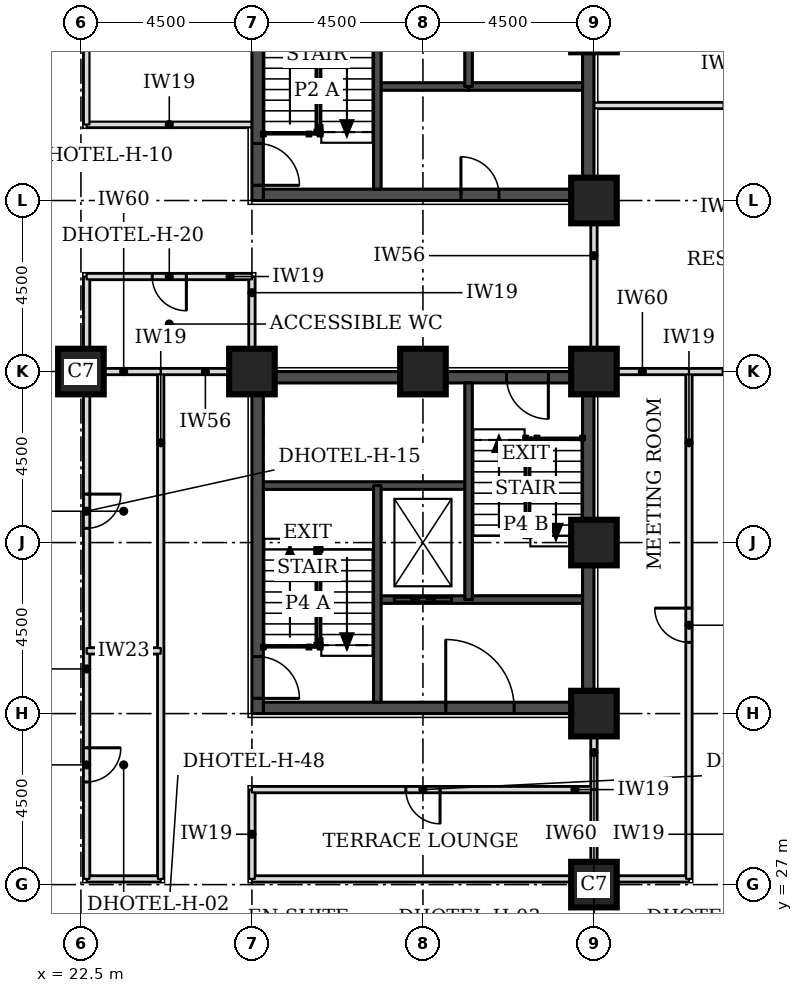
"""IFC4 building model, lengths in metres.
Left out: names, types, materials, properties, quantities, classifications, styles, units other than length and angle.
Written with IfcOpenShell. Run it as: python <this file> out.ifc"""

import sys

from ifc_helpers import new_model, si_unit, direction, frame, frame_2d, origin, origin_2d, place, context, subcontext, project, spatial, rectangle, extrude, element, fill, save


model = new_model("IFC4")
c1 = context("Model", 3, precision=1e-05, world=origin(), true_north=direction((0.0, 1.0)))
c2 = subcontext(c1, "Body", "Model", "MODEL_VIEW")
j1 = project(units=[si_unit("LENGTHUNIT", "METRE"), si_unit("PLANEANGLEUNIT", "RADIAN")], contexts=[c1])
p1 = place(None, origin())
s1 = spatial("IfcSite", under=j1, at=p1, CompositionType="ELEMENT")
p2 = place(p1, origin())
s2 = spatial("IfcBuilding", under=s1, at=p2, CompositionType="ELEMENT")
p3 = place(p2, frame((0.0, 0.0, 46.2)))
s3 = spatial("IfcBuildingStorey", under=s2, at=p3, CompositionType="ELEMENT", Elevation=46.2)
for number, where, z_axis, x_axis in (
    (1, (36.0, 27.0, 0.0), (0.0, 0.0, 1.0), (1.0, 0.0, 0.0)),
    (2, (36.0, 31.5, 0.0), (0.0, 0.0, 1.0), (1.0, 0.0, 0.0)),
    (3, (36.0, 36.0, 0.0), (0.0, 0.0, 1.0), (1.0, 0.0, 0.0)),
    (4, (22.5, 40.5, 0.0), (0.0, 0.0, 1.0), (1.0, 0.0, 0.0)),
    (5, (27.0, 40.5, 0.0), (0.0, 0.0, 1.0), (1.0, 0.0, 0.0)),
    (6, (31.5, 40.5, 0.0), (0.0, 0.0, 1.0), (1.0, 0.0, 0.0)),
    (7, (36.0, 40.5, 0.0), (0.0, 0.0, 1.0), (1.0, 0.0, 0.0)),
    (8, (36.0, 45.0, 0.0), (0.0, 0.0, 1.0), (1.0, 0.0, 0.0)),
):
    element("IfcColumn", number, at=place(p3, frame(where, z_axis=z_axis, x_axis=x_axis)), inside=s3, PredefinedType="COLUMN", context=c2, shape_type="SweptSolid", body=[
        extrude(rectangle(XDim=1.2, YDim=1.2, at=origin_2d()), origin(), (0.0, 0.0, 1.0), 3.3),
    ])
p4 = place(p3, frame((27.3, 45.15, 0.0), z_axis=(0.0, 0.0, 1.0), x_axis=(1.0, 0.0, 0.0)))
e9 = element("IfcWall", 9, at=p4, inside=s3, PredefinedType="SHEAR", context=c2, shape_type="SweptSolid", body=[
    extrude(rectangle(XDim=8.4, YDim=0.3, at=frame_2d((4.2, 0.0))), origin(), (0.0, 0.0, 1.0), 3.3),
])
p5 = place(p4, frame((5.2, 0.0, 0.0)))
e10 = element("IfcOpeningElement", 10, at=p5, cuts=e9, PredefinedType="OPENING", context=c2, shape_type="SweptSolid", body=[
    extrude(rectangle(XDim=1.0, YDim=2.1, at=frame_2d((0.5, 1.05))), frame((0.0, 0.16, 0.0), z_axis=(0.0, -1.0, 0.0), x_axis=(1.0, 0.0, 0.0)), (0.0, 0.0, 1.0), 0.32),
])
p6 = place(p3, frame((27.15, 45.0, 0.0), z_axis=(0.0, 0.0, 1.0), x_axis=(0.0, 1.0, 0.0)))
e11 = element("IfcWall", 11, at=p6, inside=s3, PredefinedType="SHEAR", context=c2, shape_type="SweptSolid", body=[
    extrude(rectangle(XDim=9.0, YDim=0.3, at=frame_2d((4.5, 0.0))), origin(), (0.0, 0.0, 1.0), 3.3),
])
p7 = place(p6, frame((0.4, 0.0, 0.0)))
e12 = element("IfcOpeningElement", 12, at=p7, cuts=e11, PredefinedType="OPENING", context=c2, shape_type="SweptSolid", body=[
    extrude(rectangle(XDim=1.1, YDim=2.1, at=frame_2d((0.55, 1.05))), frame((0.0, 0.16, 0.0), z_axis=(0.0, -1.0, 0.0), x_axis=(1.0, 0.0, 0.0)), (0.0, 0.0, 1.0), 0.32),
])
p8 = place(p3, frame((35.85, 45.0, 0.0), z_axis=(0.0, 0.0, 1.0), x_axis=(0.0, 1.0, 0.0)))
e13 = element("IfcWall", 13, at=p8, inside=s3, PredefinedType="SHEAR", context=c2, shape_type="SweptSolid", body=[
    extrude(rectangle(XDim=9.0, YDim=0.3, at=frame_2d((4.5, 0.0))), origin(), (0.0, 0.0, 1.0), 3.3),
])
p9 = place(p3, frame((27.3, 31.65, 0.0), z_axis=(0.0, 0.0, 1.0), x_axis=(1.0, 0.0, 0.0)))
e14 = element("IfcWall", 14, at=p9, inside=s3, PredefinedType="SHEAR", context=c2, shape_type="SweptSolid", body=[
    extrude(rectangle(XDim=8.4, YDim=0.3, at=frame_2d((4.2, 0.0))), origin(), (0.0, 0.0, 1.0), 3.3),
])
p10 = place(p9, frame((4.8, 0.0, 0.0)))
e15 = element("IfcOpeningElement", 15, at=p10, cuts=e14, PredefinedType="OPENING", context=c2, shape_type="SweptSolid", body=[
    extrude(rectangle(XDim=1.8, YDim=2.1, at=frame_2d((0.9, 1.05))), frame((0.0, 0.16, 0.0), z_axis=(0.0, -1.0, 0.0), x_axis=(1.0, 0.0, 0.0)), (0.0, 0.0, 1.0), 0.32),
])
p11 = place(p3, frame((27.3, 40.35, 0.0), z_axis=(0.0, 0.0, 1.0), x_axis=(1.0, 0.0, 0.0)))
e16 = element("IfcWall", 16, at=p11, inside=s3, PredefinedType="SHEAR", context=c2, shape_type="SweptSolid", body=[
    extrude(rectangle(XDim=8.4, YDim=0.3, at=frame_2d((4.2, 0.0))), origin(), (0.0, 0.0, 1.0), 3.3),
])
p12 = place(p11, frame((6.4, 0.0, 0.0)))
e17 = element("IfcOpeningElement", 17, at=p12, cuts=e16, PredefinedType="OPENING", context=c2, shape_type="SweptSolid", body=[
    extrude(rectangle(XDim=1.1, YDim=2.1, at=frame_2d((0.55, 1.05))), frame((0.0, 0.16, 0.0), z_axis=(0.0, -1.0, 0.0), x_axis=(1.0, 0.0, 0.0)), (0.0, 0.0, 1.0), 0.32),
])
p13 = place(p3, frame((27.15, 31.5, 0.0), z_axis=(0.0, 0.0, 1.0), x_axis=(0.0, 1.0, 0.0)))
e18 = element("IfcWall", 18, at=p13, inside=s3, PredefinedType="SHEAR", context=c2, shape_type="SweptSolid", body=[
    extrude(rectangle(XDim=9.0, YDim=0.3, at=frame_2d((4.5, 0.0))), origin(), (0.0, 0.0, 1.0), 3.3),
])
p14 = place(p13, frame((0.4, 0.0, 0.0)))
e19 = element("IfcOpeningElement", 19, at=p14, cuts=e18, PredefinedType="OPENING", context=c2, shape_type="SweptSolid", body=[
    extrude(rectangle(XDim=1.1, YDim=2.1, at=frame_2d((0.55, 1.05))), frame((0.0, 0.16, 0.0), z_axis=(0.0, -1.0, 0.0), x_axis=(1.0, 0.0, 0.0)), (0.0, 0.0, 1.0), 0.32),
])
p15 = place(p3, frame((35.85, 31.5, 0.0), z_axis=(0.0, 0.0, 1.0), x_axis=(0.0, 1.0, 0.0)))
e20 = element("IfcWall", 20, at=p15, inside=s3, PredefinedType="SHEAR", context=c2, shape_type="SweptSolid", body=[
    extrude(rectangle(XDim=9.0, YDim=0.3, at=frame_2d((4.5, 0.0))), origin(), (0.0, 0.0, 1.0), 3.3),
])
p16 = place(p3, frame((22.65, 27.15, 0.0), z_axis=(0.0, 0.0, 1.0), x_axis=(1.0, 0.0, 0.0)))
e21 = element("IfcWall", 21, at=p16, inside=s3, PredefinedType="PARTITIONING", context=c2, shape_type="SweptSolid", body=[
    extrude(rectangle(XDim=1.95, YDim=0.15, at=frame_2d((0.975, 0.0))), origin(), (0.0, 0.0, 1.0), 3.08),
])
p17 = place(p3, frame((22.65, 27.15, 0.0), z_axis=(0.0, 0.0, 1.0), x_axis=(0.0, 1.0, 0.0)))
e22 = element("IfcWall", 22, at=p17, inside=s3, PredefinedType="PARTITIONING", context=c2, shape_type="SweptSolid", body=[
    extrude(rectangle(XDim=15.85, YDim=0.15, at=frame_2d((7.925, 0.0))), origin(), (0.0, 0.0, 1.0), 3.08),
])
p18 = place(p17, frame((2.55, 0.0, 0.0)))
e23 = element("IfcOpeningElement", 23, at=p18, cuts=e22, PredefinedType="OPENING", context=c2, shape_type="SweptSolid", body=[
    extrude(rectangle(XDim=0.9, YDim=2.1, at=frame_2d((0.45, 1.05))), frame((0.0, 0.085, 0.0), z_axis=(0.0, -1.0, 0.0), x_axis=(1.0, 0.0, 0.0)), (0.0, 0.0, 1.0), 0.17),
])
p19 = place(p17, frame((9.225, 0.0, 0.0)))
e24 = element("IfcOpeningElement", 24, at=p19, cuts=e22, PredefinedType="OPENING", context=c2, shape_type="SweptSolid", body=[
    extrude(rectangle(XDim=0.9, YDim=2.1, at=frame_2d((0.45, 1.05))), frame((0.0, 0.085, 0.0), z_axis=(0.0, -1.0, 0.0), x_axis=(1.0, 0.0, 0.0)), (0.0, 0.0, 1.0), 0.17),
])
p20 = place(p3, frame((24.6, 27.15, 0.0), z_axis=(0.0, 0.0, 1.0), x_axis=(0.0, 1.0, 0.0)))
e25 = element("IfcWall", 25, at=p20, inside=s3, PredefinedType="PARTITIONING", context=c2, shape_type="SweptSolid", body=[
    extrude(rectangle(XDim=13.35, YDim=0.15, at=frame_2d((6.675, 0.0))), origin(), (0.0, 0.0, 1.0), 3.08),
])
p21 = place(p3, frame((27.0, 27.15, 0.0), z_axis=(0.0, 0.0, 1.0), x_axis=(1.0, 0.0, 0.0)))
e26 = element("IfcWall", 26, at=p21, inside=s3, PredefinedType="PARTITIONING", context=c2, shape_type="SweptSolid", body=[
    extrude(rectangle(XDim=11.5, YDim=0.15, at=frame_2d((5.75, 0.0))), origin(), (0.0, 0.0, 1.0), 3.08),
])
p22 = place(p3, frame((27.0, 27.15, 0.0), z_axis=(0.0, 0.0, 1.0), x_axis=(0.0, 1.0, 0.0)))
e27 = element("IfcWall", 27, at=p22, inside=s3, PredefinedType="PARTITIONING", context=c2, shape_type="SweptSolid", body=[
    extrude(rectangle(XDim=2.35, YDim=0.15, at=frame_2d((1.175, 0.0))), origin(), (0.0, 0.0, 1.0), 3.08),
])
p23 = place(p3, frame((38.5, 27.15, 0.0), z_axis=(0.0, 0.0, 1.0), x_axis=(0.0, 1.0, 0.0)))
e28 = element("IfcWall", 28, at=p23, inside=s3, PredefinedType="PARTITIONING", context=c2, shape_type="SweptSolid", body=[
    extrude(rectangle(XDim=13.35, YDim=0.15, at=frame_2d((6.675, 0.0))), origin(), (0.0, 0.0, 1.0), 3.08),
])
p24 = place(p23, frame((6.225, 0.0, 0.0)))
e29 = element("IfcOpeningElement", 29, at=p24, cuts=e28, PredefinedType="OPENING", context=c2, shape_type="SweptSolid", body=[
    extrude(rectangle(XDim=0.9, YDim=2.1, at=frame_2d((0.45, 1.05))), frame((0.0, 0.085, 0.0), z_axis=(0.0, -1.0, 0.0), x_axis=(1.0, 0.0, 0.0)), (0.0, 0.0, 1.0), 0.17),
])
p25 = place(p3, frame((27.0, 29.5, 0.0), z_axis=(0.0, 0.0, 1.0), x_axis=(1.0, 0.0, 0.0)))
e30 = element("IfcWall", 30, at=p25, inside=s3, PredefinedType="PARTITIONING", context=c2, shape_type="SweptSolid", body=[
    extrude(rectangle(XDim=9.0, YDim=0.15, at=frame_2d((4.5, 0.0))), origin(), (0.0, 0.0, 1.0), 3.08),
])
p26 = place(p25, frame((4.05, 0.0, 0.0)))
e31 = element("IfcOpeningElement", 31, at=p26, cuts=e30, PredefinedType="OPENING", context=c2, shape_type="SweptSolid", body=[
    extrude(rectangle(XDim=0.9, YDim=2.1, at=frame_2d((0.45, 1.05))), frame((0.0, 0.085, 0.0), z_axis=(0.0, -1.0, 0.0), x_axis=(1.0, 0.0, 0.0)), (0.0, 0.0, 1.0), 0.17),
])
p27 = place(p3, frame((36.0, 29.5, 0.0), z_axis=(0.0, 0.0, 1.0), x_axis=(0.0, 1.0, 0.0)))
e32 = element("IfcWall", 32, at=p27, inside=s3, PredefinedType="PARTITIONING", context=c2, shape_type="SweptSolid", body=[
    extrude(rectangle(XDim=1.95, YDim=0.15, at=frame_2d((0.975, 0.0))), origin(), (0.0, 0.0, 1.0), 2.33),
])
p28 = place(p3, frame((24.6, 40.5, 0.0), z_axis=(0.0, 0.0, 1.0), x_axis=(1.0, 0.0, 0.0)))
e33 = element("IfcWall", 33, at=p28, inside=s3, PredefinedType="PARTITIONING", context=c2, shape_type="SweptSolid", body=[
    extrude(rectangle(XDim=2.35, YDim=0.15, at=frame_2d((1.175, 0.0))), origin(), (0.0, 0.0, 1.0), 2.33),
])
p29 = place(p3, frame((38.5, 40.5, 0.0), z_axis=(0.0, 0.0, 1.0), x_axis=(1.0, 0.0, 0.0)))
e34 = element("IfcWall", 34, at=p29, inside=s3, PredefinedType="PARTITIONING", context=c2, shape_type="SweptSolid", body=[
    extrude(rectangle(XDim=1.95, YDim=0.15, at=frame_2d((0.975, 0.0))), origin(), (0.0, 0.0, 1.0), 2.33),
])
p30 = place(p3, frame((27.0, 40.55, 0.0), z_axis=(0.0, 0.0, 1.0), x_axis=(0.0, 1.0, 0.0)))
e35 = element("IfcWall", 35, at=p30, inside=s3, PredefinedType="PARTITIONING", context=c2, shape_type="SweptSolid", body=[
    extrude(rectangle(XDim=2.45, YDim=0.15, at=frame_2d((1.225, 0.0))), origin(), (0.0, 0.0, 1.0), 3.08),
])
p31 = place(p3, frame((36.0, 40.55, 0.0), z_axis=(0.0, 0.0, 1.0), x_axis=(0.0, 1.0, 0.0)))
e36 = element("IfcWall", 36, at=p31, inside=s3, PredefinedType="PARTITIONING", context=c2, shape_type="SweptSolid", body=[
    extrude(rectangle(XDim=4.4, YDim=0.15, at=frame_2d((2.2, 0.0))), origin(), (0.0, 0.0, 1.0), 2.33),
])
p32 = place(p3, frame((22.65, 43.0, 0.0), z_axis=(0.0, 0.0, 1.0), x_axis=(1.0, 0.0, 0.0)))
e37 = element("IfcWall", 37, at=p32, inside=s3, PredefinedType="PARTITIONING", context=c2, shape_type="SweptSolid", body=[
    extrude(rectangle(XDim=4.35, YDim=0.15, at=frame_2d((2.175, 0.0))), origin(), (0.0, 0.0, 1.0), 3.08),
])
p33 = place(p32, frame((1.725, 0.0, 0.0)))
e38 = element("IfcOpeningElement", 38, at=p33, cuts=e37, PredefinedType="OPENING", context=c2, shape_type="SweptSolid", body=[
    extrude(rectangle(XDim=0.9, YDim=2.1, at=frame_2d((0.45, 1.05))), frame((0.0, 0.085, 0.0), z_axis=(0.0, -1.0, 0.0), x_axis=(1.0, 0.0, 0.0)), (0.0, 0.0, 1.0), 0.17),
])
p34 = place(p3, frame((22.65, 47.0, 0.0), z_axis=(0.0, 0.0, 1.0), x_axis=(1.0, 0.0, 0.0)))
e39 = element("IfcWall", 39, at=p34, inside=s3, PredefinedType="PARTITIONING", context=c2, shape_type="SweptSolid", body=[
    extrude(rectangle(XDim=4.35, YDim=0.15, at=frame_2d((2.175, 0.0))), origin(), (0.0, 0.0, 1.0), 3.08),
])
p35 = place(p3, frame((22.65, 47.0, 0.0), z_axis=(0.0, 0.0, 1.0), x_axis=(0.0, 1.0, 0.0)))
e40 = element("IfcWall", 40, at=p35, inside=s3, PredefinedType="PARTITIONING", context=c2, shape_type="SweptSolid", body=[
    extrude(rectangle(XDim=2.5, YDim=0.15, at=frame_2d((1.25, 0.0))), origin(), (0.0, 0.0, 1.0), 3.08),
])
p36 = place(p3, frame((36.0, 27.15, 0.0), z_axis=(0.0, 0.0, 1.0), x_axis=(0.0, 1.0, 0.0)))
e41 = element("IfcWall", 41, at=p36, inside=s3, PredefinedType="PARTITIONING", context=c2, shape_type="SweptSolid", body=[
    extrude(rectangle(XDim=2.35, YDim=0.15, at=frame_2d((1.175, 0.0))), origin(), (0.0, 0.0, 1.0), 2.33),
])
p37 = place(p3, frame((22.65, 33.15, 0.0), z_axis=(0.0, 0.0, 1.0), x_axis=(1.0, 0.0, 0.0)))
e42 = element("IfcWall", 42, at=p37, inside=s3, PredefinedType="PARTITIONING", context=c2, shape_type="SweptSolid", body=[
    extrude(rectangle(XDim=1.95, YDim=0.15, at=frame_2d((0.975, 0.0))), origin(), (0.0, 0.0, 1.0), 3.08),
])
p38 = place(p3, frame((22.65, 40.5, 0.0), z_axis=(0.0, 0.0, 1.0), x_axis=(1.0, 0.0, 0.0)))
e43 = element("IfcWall", 43, at=p38, inside=s3, PredefinedType="PARTITIONING", context=c2, shape_type="SweptSolid", body=[
    extrude(rectangle(XDim=1.95, YDim=0.15, at=frame_2d((0.975, 0.0))), origin(), (0.0, 0.0, 1.0), 2.33),
])
p39 = place(p3, frame((36.05, 40.5, 0.0), z_axis=(0.0, 0.0, 1.0), x_axis=(1.0, 0.0, 0.0)))
e44 = element("IfcWall", 44, at=p39, inside=s3, PredefinedType="PARTITIONING", context=c2, shape_type="SweptSolid", body=[
    extrude(rectangle(XDim=2.45, YDim=0.15, at=frame_2d((1.225, 0.0))), origin(), (0.0, 0.0, 1.0), 2.33),
])
p40 = place(p3, frame((36.0, 47.5, 0.0), z_axis=(0.0, 0.0, 1.0), x_axis=(1.0, 0.0, 0.0)))
e45 = element("IfcWall", 45, at=p40, inside=s3, PredefinedType="PARTITIONING", context=c2, shape_type="SweptSolid", body=[
    extrude(rectangle(XDim=7.0, YDim=0.15, at=frame_2d((3.5, 0.0))), origin(), (0.0, 0.0, 1.0), 3.08),
])
p41 = place(p3, frame((30.3, 48.0, 0.0), z_axis=(0.0, 0.0, 1.0), x_axis=(1.0, 0.0, 0.0)))
e46 = element("IfcWall", 46, at=p41, inside=s3, PredefinedType="SOLIDWALL", context=c2, shape_type="SweptSolid", body=[
    extrude(rectangle(XDim=2.4, YDim=0.2, at=frame_2d((1.2, 0.0))), origin(), (0.0, 0.0, 1.0), 3.08),
])
p42 = place(p3, frame((32.7, 48.0, 0.0), z_axis=(0.0, 0.0, 1.0), x_axis=(1.0, 0.0, 0.0)))
e47 = element("IfcWall", 47, at=p42, inside=s3, PredefinedType="SOLIDWALL", context=c2, shape_type="SweptSolid", body=[
    extrude(rectangle(XDim=3.0, YDim=0.2, at=frame_2d((1.5, 0.0))), origin(), (0.0, 0.0, 1.0), 3.08),
])
for number, where, z_axis, x_axis in (
    (48, (30.3, 45.3, 0.0), (0.0, 0.0, 1.0), (0.0, 1.0, 0.0)),
    (49, (32.7, 48.0, 0.0), (0.0, 0.0, 1.0), (0.0, 1.0, 0.0)),
):
    element("IfcWall", number, at=place(p3, frame(where, z_axis=z_axis, x_axis=x_axis)), inside=s3, PredefinedType="SOLIDWALL", context=c2, shape_type="SweptSolid", body=[
        extrude(rectangle(XDim=5.7, YDim=0.2, at=frame_2d((2.85, 0.0))), origin(), (0.0, 0.0, 1.0), 3.08),
    ])
p43 = place(p3, frame((30.3, 34.5, 0.0), z_axis=(0.0, 0.0, 1.0), x_axis=(1.0, 0.0, 0.0)))
e50 = element("IfcWall", 50, at=p43, inside=s3, PredefinedType="SOLIDWALL", context=c2, shape_type="SweptSolid", body=[
    extrude(rectangle(XDim=5.4, YDim=0.2, at=frame_2d((2.7, 0.0))), origin(), (0.0, 0.0, 1.0), 3.08),
])
p44 = place(p43, frame((0.45, 0.0, 0.0)))
e51 = element("IfcOpeningElement", 51, at=p44, cuts=e50, PredefinedType="OPENING", context=c2, shape_type="SweptSolid", body=[
    extrude(rectangle(XDim=1.5, YDim=2.1, at=frame_2d((0.75, 1.05))), frame((0.0, 0.11, 0.0), z_axis=(0.0, -1.0, 0.0), x_axis=(1.0, 0.0, 0.0)), (0.0, 0.0, 1.0), 0.22),
])
p45 = place(p3, frame((27.3, 37.5, 0.0), z_axis=(0.0, 0.0, 1.0), x_axis=(1.0, 0.0, 0.0)))
e52 = element("IfcWall", 52, at=p45, inside=s3, PredefinedType="SOLIDWALL", context=c2, shape_type="SweptSolid", body=[
    extrude(rectangle(XDim=5.4, YDim=0.2, at=frame_2d((2.7, 0.0))), origin(), (0.0, 0.0, 1.0), 3.08),
])
for number, where, z_axis, x_axis in (
    (53, (30.3, 31.8, 0.0), (0.0, 0.0, 1.0), (0.0, 1.0, 0.0)),
    (54, (32.7, 34.5, 0.0), (0.0, 0.0, 1.0), (0.0, 1.0, 0.0)),
):
    element("IfcWall", number, at=place(p3, frame(where, z_axis=z_axis, x_axis=x_axis)), inside=s3, PredefinedType="SOLIDWALL", context=c2, shape_type="SweptSolid", body=[
        extrude(rectangle(XDim=5.7, YDim=0.2, at=frame_2d((2.85, 0.0))), origin(), (0.0, 0.0, 1.0), 3.08),
    ])
p46 = place(p18, frame((0.9, 0.0, 0.0), z_axis=(0.0, 0.0, 1.0), x_axis=(-1.0, 0.0, 0.0)))
e55 = element("IfcDoor", 55, at=p46, inside=s3, OperationType="SINGLE_SWING_LEFT", PredefinedType="DOOR", context=c2, shape_type="SweptSolid", body=[
    extrude(rectangle(XDim=0.9, YDim=2.1, at=frame_2d((0.45, 1.05))), frame((0.0, 0.025, 0.0), z_axis=(0.0, -1.0, 0.0), x_axis=(1.0, 0.0, 0.0)), (0.0, 0.0, 1.0), 0.05),
])
fill(e23, e55)
p47 = place(p19, frame((0.9, 0.0, 0.0), z_axis=(0.0, 0.0, 1.0), x_axis=(-1.0, 0.0, 0.0)))
e56 = element("IfcDoor", 56, at=p47, inside=s3, OperationType="SINGLE_SWING_LEFT", PredefinedType="DOOR", context=c2, shape_type="SweptSolid", body=[
    extrude(rectangle(XDim=0.9, YDim=2.1, at=frame_2d((0.45, 1.05))), frame((0.0, 0.025, 0.0), z_axis=(0.0, -1.0, 0.0), x_axis=(1.0, 0.0, 0.0)), (0.0, 0.0, 1.0), 0.05),
])
fill(e24, e56)
p48 = place(p26, frame((0.9, 0.0, 0.0), z_axis=(0.0, 0.0, 1.0), x_axis=(-1.0, 0.0, 0.0)))
e57 = element("IfcDoor", 57, at=p48, inside=s3, OperationType="SINGLE_SWING_LEFT", PredefinedType="DOOR", context=c2, shape_type="SweptSolid", body=[
    extrude(rectangle(XDim=0.9, YDim=2.1, at=frame_2d((0.45, 1.05))), frame((0.0, 0.025, 0.0), z_axis=(0.0, -1.0, 0.0), x_axis=(1.0, 0.0, 0.0)), (0.0, 0.0, 1.0), 0.05),
])
fill(e31, e57)
p49 = place(p24, origin())
e58 = element("IfcDoor", 58, at=p49, inside=s3, OperationType="SINGLE_SWING_RIGHT", PredefinedType="DOOR", context=c2, shape_type="SweptSolid", body=[
    extrude(rectangle(XDim=0.9, YDim=2.1, at=frame_2d((0.45, 1.05))), frame((0.0, 0.025, 0.0), z_axis=(0.0, -1.0, 0.0), x_axis=(1.0, 0.0, 0.0)), (0.0, 0.0, 1.0), 0.05),
])
fill(e29, e58)
p50 = place(p33, frame((0.9, 0.0, 0.0), z_axis=(0.0, 0.0, 1.0), x_axis=(-1.0, 0.0, 0.0)))
e59 = element("IfcDoor", 59, at=p50, inside=s3, OperationType="SINGLE_SWING_LEFT", PredefinedType="DOOR", context=c2, shape_type="SweptSolid", body=[
    extrude(rectangle(XDim=0.9, YDim=2.1, at=frame_2d((0.45, 1.05))), frame((0.0, 0.025, 0.0), z_axis=(0.0, -1.0, 0.0), x_axis=(1.0, 0.0, 0.0)), (0.0, 0.0, 1.0), 0.05),
])
fill(e38, e59)
p51 = place(p7, frame((1.1, 0.0, 0.0), z_axis=(0.0, 0.0, 1.0), x_axis=(-1.0, 0.0, 0.0)))
e60 = element("IfcDoor", 60, at=p51, inside=s3, OperationType="SINGLE_SWING_RIGHT", PredefinedType="DOOR", context=c2, shape_type="SweptSolid", body=[
    extrude(rectangle(XDim=1.1, YDim=2.1, at=frame_2d((0.55, 1.05))), frame((0.0, 0.025, 0.0), z_axis=(0.0, -1.0, 0.0), x_axis=(1.0, 0.0, 0.0)), (0.0, 0.0, 1.0), 0.05),
])
fill(e12, e60)
p52 = place(p5, origin())
e61 = element("IfcDoor", 61, at=p52, inside=s3, OperationType="SINGLE_SWING_LEFT", PredefinedType="DOOR", context=c2, shape_type="SweptSolid", body=[
    extrude(rectangle(XDim=1.0, YDim=2.1, at=frame_2d((0.5, 1.05))), frame((0.0, 0.025, 0.0), z_axis=(0.0, -1.0, 0.0), x_axis=(1.0, 0.0, 0.0)), (0.0, 0.0, 1.0), 0.05),
])
fill(e10, e61)
p53 = place(p14, frame((1.1, 0.0, 0.0), z_axis=(0.0, 0.0, 1.0), x_axis=(-1.0, 0.0, 0.0)))
e62 = element("IfcDoor", 62, at=p53, inside=s3, OperationType="SINGLE_SWING_RIGHT", PredefinedType="DOOR", context=c2, shape_type="SweptSolid", body=[
    extrude(rectangle(XDim=1.1, YDim=2.1, at=frame_2d((0.55, 1.05))), frame((0.0, 0.025, 0.0), z_axis=(0.0, -1.0, 0.0), x_axis=(1.0, 0.0, 0.0)), (0.0, 0.0, 1.0), 0.05),
])
fill(e19, e62)
p54 = place(p12, frame((1.1, 0.0, 0.0), z_axis=(0.0, 0.0, 1.0), x_axis=(-1.0, 0.0, 0.0)))
e63 = element("IfcDoor", 63, at=p54, inside=s3, OperationType="SINGLE_SWING_LEFT", PredefinedType="DOOR", context=c2, shape_type="SweptSolid", body=[
    extrude(rectangle(XDim=1.1, YDim=2.1, at=frame_2d((0.55, 1.05))), frame((0.0, 0.025, 0.0), z_axis=(0.0, -1.0, 0.0), x_axis=(1.0, 0.0, 0.0)), (0.0, 0.0, 1.0), 0.05),
])
fill(e17, e63)
p55 = place(p44, origin())
e64 = element("IfcDoor", 64, at=p55, inside=s3, OperationType="DOUBLE_DOOR_SLIDING", PredefinedType="DOOR", context=c2, shape_type="SweptSolid", body=[
    extrude(rectangle(XDim=1.5, YDim=2.1, at=frame_2d((0.75, 1.05))), frame((0.0, 0.025, 0.0), z_axis=(0.0, -1.0, 0.0), x_axis=(1.0, 0.0, 0.0)), (0.0, 0.0, 1.0), 0.05),
])
fill(e51, e64)
p56 = place(p10, origin())
e65 = element("IfcDoor", 65, at=p56, inside=s3, OperationType="SINGLE_SWING_LEFT", PredefinedType="DOOR", context=c2, shape_type="SweptSolid", body=[
    extrude(rectangle(XDim=1.8, YDim=2.1, at=frame_2d((0.9, 1.05))), frame((0.0, 0.025, 0.0), z_axis=(0.0, -1.0, 0.0), x_axis=(1.0, 0.0, 0.0)), (0.0, 0.0, 1.0), 0.05),
])
fill(e15, e65)
save(model, sys.argv[1])
